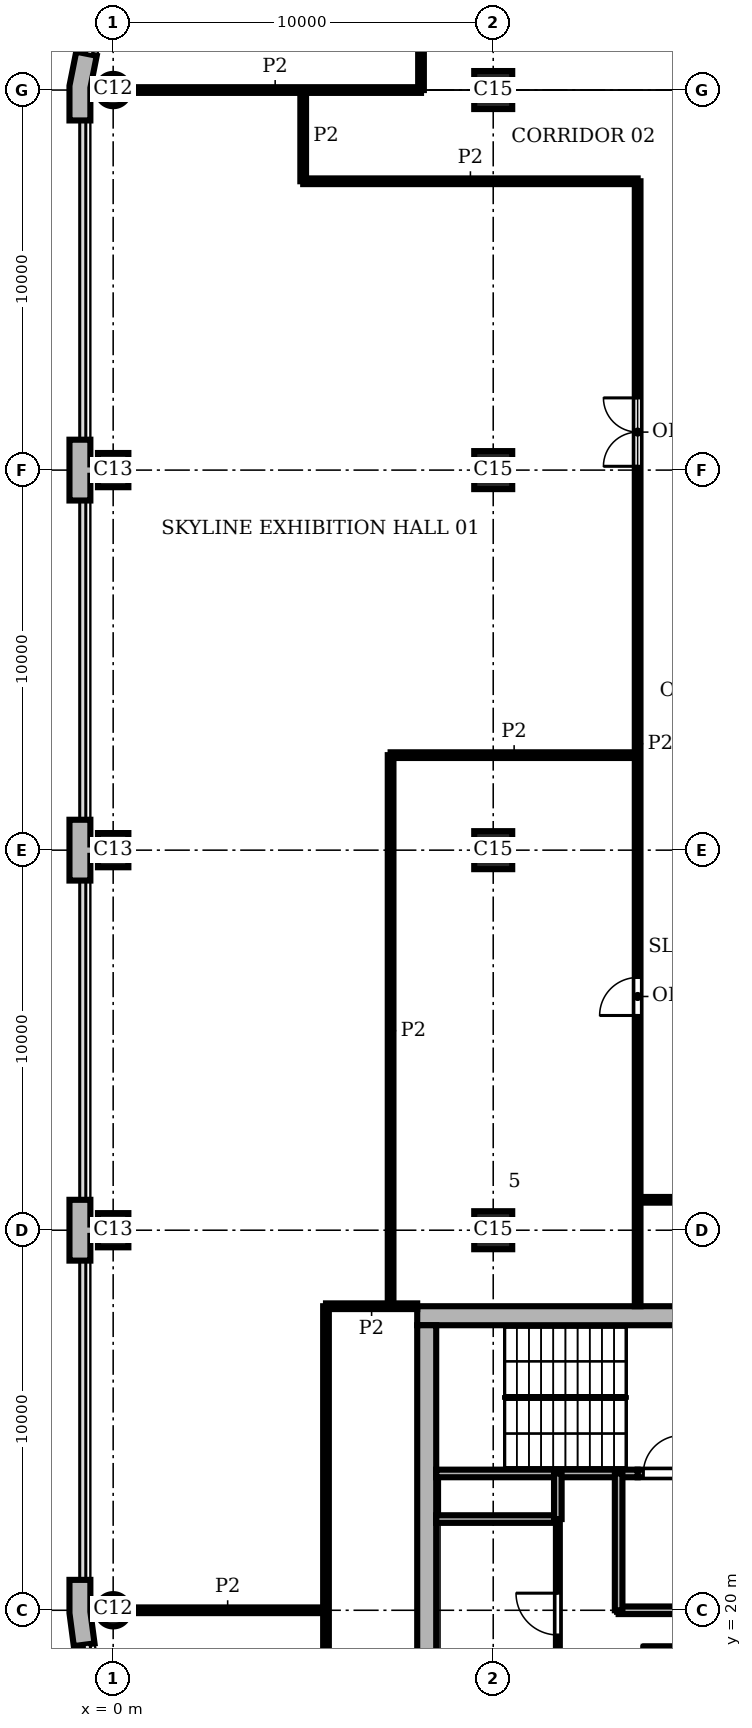
"""IFC4 building model, lengths in metres.
Left out: names, types, materials, properties, quantities, classifications, styles, units other than length and angle.
Written with IfcOpenShell. Run it as: python <this file> out.ifc"""

import sys

from ifc_helpers import new_model, si_unit, direction, frame, frame_2d, origin, origin_2d, place, context, subcontext, project, spatial, polyline, rectangle, circle, outline, extrude, element, fill, save


model = new_model("IFC4")
c1 = context("Model", 3, precision=1e-05, world=origin(), true_north=direction((0.0, 1.0)))
c2 = subcontext(c1, "Body", "Model", "MODEL_VIEW")
j1 = project(units=[si_unit("LENGTHUNIT", "METRE"), si_unit("PLANEANGLEUNIT", "RADIAN")], contexts=[c1])
p1 = place(None, origin())
s1 = spatial("IfcSite", under=j1, at=p1, CompositionType="ELEMENT")
p2 = place(p1, origin())
s2 = spatial("IfcBuilding", under=s1, at=p2, CompositionType="ELEMENT")
p3 = place(p2, frame((0.0, 0.0, 358.2)))
s3 = spatial("IfcBuildingStorey", under=s2, at=p3, CompositionType="ELEMENT", Elevation=358.2)
p4 = place(p3, frame((0.0, 60.0, 0.0), z_axis=(0.0, 0.0, 1.0), x_axis=(1.0, 0.0, 0.0)))
e1 = element("IfcColumn", 1, at=p4, inside=s3, PredefinedType="COLUMN", context=c2, shape_type="SweptSolid", body=[
    extrude(circle(Radius=0.425, at=origin_2d()), origin(), (0.0, 0.0, 1.0), 7.2),
])
for number, where, z_axis, x_axis in (
    (2, (0.0, 50.0, 0.0), (0.0, 0.0, 1.0), (0.0, 1.0, 0.0)),
    (3, (0.0, 40.0, 0.0), (0.0, 0.0, 1.0), (0.0, 1.0, 0.0)),
    (4, (0.0, 30.0, 0.0), (0.0, 0.0, 1.0), (0.0, 1.0, 0.0)),
):
    element("IfcColumn", number, at=place(p3, frame(where, z_axis=z_axis, x_axis=x_axis)), inside=s3, PredefinedType="COLUMN", context=c2, shape_type="SweptSolid", body=[
        extrude(rectangle(XDim=0.9, YDim=0.8, at=origin_2d()), origin(), (0.0, 0.0, 1.0), 7.2),
    ])
p5 = place(p3, frame((0.0, 20.0, 0.0), z_axis=(0.0, 0.0, 1.0), x_axis=(1.0, 0.0, 0.0)))
e5 = element("IfcColumn", 5, at=p5, inside=s3, PredefinedType="COLUMN", context=c2, shape_type="SweptSolid", body=[
    extrude(circle(Radius=0.425, at=origin_2d()), origin(), (0.0, 0.0, 1.0), 7.2),
])
for number, where, z_axis, x_axis in (
    (6, (10.0, 30.0, 0.0), (0.0, 0.0, 1.0), (1.0, 0.0, 0.0)),
    (7, (10.0, 40.0, 0.0), (0.0, 0.0, 1.0), (1.0, 0.0, 0.0)),
    (8, (10.0, 50.0, 0.0), (0.0, 0.0, 1.0), (1.0, 0.0, 0.0)),
    (9, (10.0, 60.0, 0.0), (0.0, 0.0, 1.0), (1.0, 0.0, 0.0)),
):
    element("IfcColumn", number, at=place(p3, frame(where, z_axis=z_axis, x_axis=x_axis)), inside=s3, PredefinedType="COLUMN", context=c2, shape_type="SweptSolid", body=[
        extrude(rectangle(XDim=1.0, YDim=1.0, at=origin_2d()), origin(), (0.0, 0.0, 1.0), 7.2),
    ])
p6 = place(p3, frame((28.0, 27.75, 0.0), z_axis=(0.0, 0.0, 1.0), x_axis=(-1.0, 0.0, 0.0)))
e10 = element("IfcWall", 10, at=p6, inside=s3, PredefinedType="SHEAR", context=c2, shape_type="SweptSolid", body=[
    extrude(rectangle(XDim=20.0, YDim=0.5, at=frame_2d((10.0, 0.0))), origin(), (0.0, 0.0, 1.0), 7.2),
])
p7 = place(p3, frame((8.25, 27.5, 0.0), z_axis=(0.0, 0.0, 1.0), x_axis=(0.0, -1.0, 0.0)))
e11 = element("IfcWall", 11, at=p7, inside=s3, PredefinedType="SHEAR", context=c2, shape_type="SweptSolid", body=[
    extrude(rectangle(XDim=19.0, YDim=0.5, at=frame_2d((9.5, 0.0))), origin(), (0.0, 0.0, 1.0), 7.2),
])
p8 = place(p3, origin())
e12 = element("IfcWall", 12, at=p8, inside=s3, PredefinedType="SOLIDWALL", context=c2, shape_type="SweptSolid", body=[
    extrude(outline(polyline([(-0.825, 60.98), (-0.972, 61.009), (-1.15, 60.113), (-1.15, 59.2), (-1.0, 59.2), (-0.6, 59.2), (-0.6, 60.059), (-0.432, 60.902), (-0.825, 60.98)])), origin(), (0.0, 0.0, 1.0), 7.2),
])
e13 = element("IfcWall", 13, at=p8, inside=s3, PredefinedType="SOLIDWALL", context=c2, shape_type="SweptSolid", body=[
    extrude(outline(polyline([(-0.6, 49.2), (-0.6, 49.85), (0.0, 49.85), (0.0, 50.15), (-0.6, 50.15), (-0.6, 50.8), (-1.0, 50.8), (-1.15, 50.8), (-1.15, 50.0), (-1.15, 49.2), (-1.0, 49.2), (-0.6, 49.2)])), origin(), (0.0, 0.0, 1.0), 7.2),
])
e14 = element("IfcWall", 14, at=p8, inside=s3, PredefinedType="SOLIDWALL", context=c2, shape_type="SweptSolid", body=[
    extrude(outline(polyline([(-0.6, 39.2), (-0.6, 39.85), (-0.45, 39.85), (-0.45, 40.15), (-0.6, 40.15), (-0.6, 40.8), (-1.0, 40.8), (-1.15, 40.8), (-1.15, 40.0), (-1.15, 39.2), (-1.0, 39.2), (-0.6, 39.2)])), origin(), (0.0, 0.0, 1.0), 7.2),
])
e15 = element("IfcWall", 15, at=p8, inside=s3, PredefinedType="SOLIDWALL", context=c2, shape_type="SweptSolid", body=[
    extrude(outline(polyline([(-0.6, 29.2), (-0.6, 29.85), (0.0, 29.85), (0.0, 30.15), (-0.6, 30.15), (-0.6, 30.8), (-1.0, 30.8), (-1.15, 30.8), (-1.15, 30.0), (-1.15, 29.2), (-1.0, 29.2), (-0.6, 29.2)])), origin(), (0.0, 0.0, 1.0), 7.2),
])
e16 = element("IfcWall", 16, at=p8, inside=s3, PredefinedType="SOLIDWALL", context=c2, shape_type="SweptSolid", body=[
    extrude(outline(polyline([(-1.0, 20.8), (-1.15, 20.8), (-1.15, 19.925), (-1.036, 19.057), (-0.887, 19.076), (-0.49, 19.128), (-0.6, 19.961), (-0.6, 20.8), (-1.0, 20.8)])), origin(), (0.0, 0.0, 1.0), 7.2),
])
p9 = place(p3, frame((14.0, 19.0, 0.0), z_axis=(0.0, 0.0, 1.0), x_axis=(1.0, 0.0, 0.0)))
e17 = element("IfcWall", 17, at=p9, inside=s3, PredefinedType="PARTITIONING", context=c2, shape_type="SweptSolid", body=[
    extrude(rectangle(XDim=8.0, YDim=0.1, at=frame_2d((4.0, 0.0))), origin(), (0.0, 0.0, 1.0), 6.75),
])
p10 = place(p9, frame((5.45, 0.0, 0.0)))
e18 = element("IfcOpeningElement", 18, at=p10, cuts=e17, PredefinedType="OPENING", context=c2, shape_type="SweptSolid", body=[
    extrude(rectangle(XDim=1.1, YDim=2.1, at=frame_2d((0.55, 1.05))), frame((0.0, 0.06, 0.0), z_axis=(0.0, -1.0, 0.0), x_axis=(1.0, 0.0, 0.0)), (0.0, 0.0, 1.0), 0.12),
])
p11 = place(p3, frame((13.3, 20.0, 0.0), z_axis=(0.0, 0.0, 1.0), x_axis=(1.0, 0.0, 0.0)))
e19 = element("IfcWall", 19, at=p11, inside=s3, PredefinedType="SHEAR", context=c2, shape_type="SweptSolid", body=[
    extrude(rectangle(XDim=4.7, YDim=0.2, at=frame_2d((2.35, 0.0))), origin(), (0.0, 0.0, 1.0), 6.75),
])
p12 = place(p3, frame((8.5, 22.4, 0.0), z_axis=(0.0, 0.0, 1.0), x_axis=(1.0, 0.0, 0.0)))
e20 = element("IfcWall", 20, at=p12, inside=s3, PredefinedType="SHEAR", context=c2, shape_type="SweptSolid", body=[
    extrude(rectangle(XDim=3.2, YDim=0.2, at=frame_2d((1.6, 0.0))), origin(), (0.0, 0.0, 1.0), 6.75),
])
p13 = place(p3, frame((8.5, 23.6, 0.0), z_axis=(0.0, 0.0, 1.0), x_axis=(1.0, 0.0, 0.0)))
e21 = element("IfcWall", 21, at=p13, inside=s3, PredefinedType="SHEAR", context=c2, shape_type="SweptSolid", body=[
    extrude(rectangle(XDim=5.3, YDim=0.2, at=frame_2d((2.65, 0.0))), origin(), (0.0, 0.0, 1.0), 6.75),
])
p14 = place(p3, frame((13.8, 23.6, 0.0), z_axis=(0.0, 0.0, 1.0), x_axis=(1.0, 0.0, 0.0)))
e22 = element("IfcWall", 22, at=p14, inside=s3, PredefinedType="SHEAR", context=c2, shape_type="SweptSolid", body=[
    extrude(rectangle(XDim=13.7, YDim=0.2, at=frame_2d((6.85, 0.0))), origin(), (0.0, 0.0, 1.0), 6.75),
])
p15 = place(p14, frame((2.4, 0.0, 0.0)))
e23 = element("IfcOpeningElement", 23, at=p15, cuts=e22, PredefinedType="OPENING", context=c2, shape_type="SweptSolid", body=[
    extrude(rectangle(XDim=1.1, YDim=2.1, at=frame_2d((0.55, 1.05))), frame((0.0, 0.11, 0.0), z_axis=(0.0, -1.0, 0.0), x_axis=(1.0, 0.0, 0.0)), (0.0, 0.0, 1.0), 0.22),
])
p16 = place(p14, frame((4.9, 0.0, 0.0)))
e24 = element("IfcOpeningElement", 24, at=p16, cuts=e22, PredefinedType="OPENING", context=c2, shape_type="SweptSolid", body=[
    extrude(rectangle(XDim=1.1, YDim=2.1, at=frame_2d((0.55, 1.05))), frame((0.0, 0.11, 0.0), z_axis=(0.0, -1.0, 0.0), x_axis=(1.0, 0.0, 0.0)), (0.0, 0.0, 1.0), 0.22),
])
p17 = place(p14, frame((0.15, 0.0, 0.0)))
e25 = element("IfcOpeningElement", 25, at=p17, cuts=e22, PredefinedType="OPENING", context=c2, shape_type="SweptSolid", body=[
    extrude(rectangle(XDim=1.0, YDim=2.1, at=frame_2d((0.5, 1.05))), frame((0.0, 0.11, 0.0), z_axis=(0.0, -1.0, 0.0), x_axis=(1.0, 0.0, 0.0)), (0.0, 0.0, 1.0), 0.22),
])
p18 = place(p3, frame((11.7, 12.4, 0.0), z_axis=(0.0, 0.0, 1.0), x_axis=(0.0, 1.0, 0.0)))
e26 = element("IfcWall", 26, at=p18, inside=s3, PredefinedType="PARTITIONING", context=c2, shape_type="SweptSolid", body=[
    extrude(rectangle(XDim=10.0, YDim=0.1, at=frame_2d((5.0, 0.0))), origin(), (0.0, 0.0, 1.0), 6.75),
])
p19 = place(p18, frame((1.95, 0.0, 0.0)))
e27 = element("IfcOpeningElement", 27, at=p19, cuts=e26, PredefinedType="OPENING", context=c2, shape_type="SweptSolid", body=[
    extrude(rectangle(XDim=1.1, YDim=2.1, at=frame_2d((0.55, 1.05))), frame((0.0, 0.06, 0.0), z_axis=(0.0, -1.0, 0.0), x_axis=(1.0, 0.0, 0.0)), (0.0, 0.0, 1.0), 0.12),
])
p20 = place(p18, frame((6.95, 0.0, 0.0)))
e28 = element("IfcOpeningElement", 28, at=p20, cuts=e26, PredefinedType="OPENING", context=c2, shape_type="SweptSolid", body=[
    extrude(rectangle(XDim=1.1, YDim=2.1, at=frame_2d((0.55, 1.05))), frame((0.0, 0.06, 0.0), z_axis=(0.0, -1.0, 0.0), x_axis=(1.0, 0.0, 0.0)), (0.0, 0.0, 1.0), 0.12),
])
p21 = place(p3, frame((11.7, 22.4, 0.0), z_axis=(0.0, 0.0, 1.0), x_axis=(0.0, 1.0, 0.0)))
e29 = element("IfcWall", 29, at=p21, inside=s3, PredefinedType="SHEAR", context=c2, shape_type="SweptSolid", body=[
    extrude(rectangle(XDim=1.2, YDim=0.2, at=frame_2d((0.6, 0.0))), origin(), (0.0, 0.0, 1.0), 6.75),
])
p22 = place(p3, frame((13.3, 20.0, 0.0), z_axis=(0.0, 0.0, 1.0), x_axis=(0.0, 1.0, 0.0)))
e30 = element("IfcWall", 30, at=p22, inside=s3, PredefinedType="SHEAR", context=c2, shape_type="SweptSolid", body=[
    extrude(rectangle(XDim=3.6, YDim=0.2, at=frame_2d((1.8, 0.0))), origin(), (0.0, 0.0, 1.0), 6.75),
])
p23 = place(p3, frame((5.0, 57.6, 0.0), z_axis=(0.0, 0.0, 1.0), x_axis=(0.0, 1.0, 0.0)))
e31 = element("IfcWall", 31, at=p23, inside=s3, PredefinedType="PARTITIONING", context=c2, shape_type="SweptSolid", body=[
    extrude(rectangle(XDim=2.4, YDim=0.15, at=frame_2d((1.2, 0.0))), origin(), (0.0, 0.0, 1.0), 6.75),
])
p24 = place(p3, frame((5.6, 5.6, 0.0), z_axis=(0.0, 0.0, 1.0), x_axis=(0.0, 1.0, 0.0)))
e32 = element("IfcWall", 32, at=p24, inside=s3, PredefinedType="PARTITIONING", context=c2, shape_type="SweptSolid", body=[
    extrude(rectangle(XDim=22.4, YDim=0.15, at=frame_2d((11.2, 0.0))), origin(), (0.0, 0.0, 1.0), 6.75),
])
p25 = place(p24, frame((4.1, 0.0, 0.0)))
e33 = element("IfcOpeningElement", 33, at=p25, cuts=e32, PredefinedType="OPENING", context=c2, shape_type="SweptSolid", body=[
    extrude(rectangle(XDim=1.0, YDim=2.1, at=frame_2d((0.5, 1.05))), frame((0.0, 0.085, 0.0), z_axis=(0.0, -1.0, 0.0), x_axis=(1.0, 0.0, 0.0)), (0.0, 0.0, 1.0), 0.17),
])
p26 = place(p24, frame((11.5, 0.0, 0.0)))
e34 = element("IfcOpeningElement", 34, at=p26, cuts=e32, PredefinedType="OPENING", context=c2, shape_type="SweptSolid", body=[
    extrude(rectangle(XDim=0.8, YDim=2.1, at=frame_2d((0.4, 1.05))), frame((0.0, 0.085, 0.0), z_axis=(0.0, -1.0, 0.0), x_axis=(1.0, 0.0, 0.0)), (0.0, 0.0, 1.0), 0.17),
])
p27 = place(p3, frame((7.3, 28.0, 0.0), z_axis=(0.0, 0.0, 1.0), x_axis=(0.0, 1.0, 0.0)))
e35 = element("IfcWall", 35, at=p27, inside=s3, PredefinedType="PARTITIONING", context=c2, shape_type="SweptSolid", body=[
    extrude(rectangle(XDim=14.5, YDim=0.15, at=frame_2d((7.25, 0.0))), origin(), (0.0, 0.0, 1.0), 6.75),
])
p28 = place(p3, frame((8.1, 60.0, 0.0), z_axis=(0.0, 0.0, 1.0), x_axis=(0.0, 1.0, 0.0)))
e36 = element("IfcWall", 36, at=p28, inside=s3, PredefinedType="PARTITIONING", context=c2, shape_type="SweptSolid", body=[
    extrude(rectangle(XDim=6.4, YDim=0.15, at=frame_2d((3.2, 0.0))), origin(), (0.0, 0.0, 1.0), 6.75),
])
p29 = place(p28, frame((1.85, 0.0, 0.0)))
e37 = element("IfcOpeningElement", 37, at=p29, cuts=e36, PredefinedType="OPENING", context=c2, shape_type="SweptSolid", body=[
    extrude(rectangle(XDim=1.8, YDim=2.1, at=frame_2d((0.9, 1.05))), frame((0.0, 0.085, 0.0), z_axis=(0.0, -1.0, 0.0), x_axis=(1.0, 0.0, 0.0)), (0.0, 0.0, 1.0), 0.17),
])
p30 = place(p3, frame((13.8, 28.0, 0.0), z_axis=(0.0, 0.0, 1.0), x_axis=(0.0, 1.0, 0.0)))
e38 = element("IfcWall", 38, at=p30, inside=s3, PredefinedType="PARTITIONING", context=c2, shape_type="SweptSolid", body=[
    extrude(rectangle(XDim=29.6, YDim=0.15, at=frame_2d((14.8, 0.0))), origin(), (0.0, 0.0, 1.0), 6.75),
])
p31 = place(p30, frame((7.65, 0.0, 0.0)))
e39 = element("IfcOpeningElement", 39, at=p31, cuts=e38, PredefinedType="OPENING", context=c2, shape_type="SweptSolid", body=[
    extrude(rectangle(XDim=1.0, YDim=2.1, at=frame_2d((0.5, 1.05))), frame((0.0, 0.085, 0.0), z_axis=(0.0, -1.0, 0.0), x_axis=(1.0, 0.0, 0.0)), (0.0, 0.0, 1.0), 0.17),
])
p32 = place(p30, frame((22.1, 0.0, 0.0)))
e40 = element("IfcOpeningElement", 40, at=p32, cuts=e38, PredefinedType="OPENING", context=c2, shape_type="SweptSolid", body=[
    extrude(rectangle(XDim=1.8, YDim=2.1, at=frame_2d((0.9, 1.05))), frame((0.0, 0.085, 0.0), z_axis=(0.0, -1.0, 0.0), x_axis=(1.0, 0.0, 0.0)), (0.0, 0.0, 1.0), 0.17),
])
p33 = place(p3, frame((0.425, 20.0, 0.0), z_axis=(0.0, 0.0, 1.0), x_axis=(1.0, 0.0, 0.0)))
e41 = element("IfcWall", 41, at=p33, inside=s3, PredefinedType="PARTITIONING", context=c2, shape_type="SweptSolid", body=[
    extrude(rectangle(XDim=5.175, YDim=0.15, at=frame_2d((2.587, 0.0))), origin(), (0.0, 0.0, 1.0), 6.75),
])
p34 = place(p3, frame((5.6, 28.0, 0.0), z_axis=(0.0, 0.0, 1.0), x_axis=(1.0, 0.0, 0.0)))
e42 = element("IfcWall", 42, at=p34, inside=s3, PredefinedType="PARTITIONING", context=c2, shape_type="SweptSolid", body=[
    extrude(rectangle(XDim=2.4, YDim=0.15, at=frame_2d((1.2, 0.0))), origin(), (0.0, 0.0, 1.0), 6.75),
])
p35 = place(p3, frame((13.802, 30.8, 0.0), z_axis=(0.0, 0.0, 1.0), x_axis=(1.0, 0.0, 0.0)))
e43 = element("IfcWall", 43, at=p35, inside=s3, PredefinedType="PARTITIONING", context=c2, shape_type="SweptSolid", body=[
    extrude(rectangle(XDim=16.797, YDim=0.15, at=frame_2d((8.398, 0.0))), origin(), (0.0, 0.0, 1.0), 6.75),
])
p36 = place(p35, frame((7.85, 0.0, 0.0)))
e44 = element("IfcOpeningElement", 44, at=p36, cuts=e43, PredefinedType="OPENING", context=c2, shape_type="SweptSolid", body=[
    extrude(rectangle(XDim=1.0, YDim=2.1, at=frame_2d((0.5, 1.05))), frame((0.0, 0.085, 0.0), z_axis=(0.0, -1.0, 0.0), x_axis=(1.0, 0.0, 0.0)), (0.0, 0.0, 1.0), 0.17),
])
p37 = place(p3, frame((7.3, 42.5, 0.0), z_axis=(0.0, 0.0, 1.0), x_axis=(1.0, 0.0, 0.0)))
e45 = element("IfcWall", 45, at=p37, inside=s3, PredefinedType="PARTITIONING", context=c2, shape_type="SweptSolid", body=[
    extrude(rectangle(XDim=6.5, YDim=0.15, at=frame_2d((3.25, 0.0))), origin(), (0.0, 0.0, 1.0), 6.75),
])
p38 = place(p3, frame((5.0, 57.6, 0.0), z_axis=(0.0, 0.0, 1.0), x_axis=(1.0, 0.0, 0.0)))
e46 = element("IfcWall", 46, at=p38, inside=s3, PredefinedType="PARTITIONING", context=c2, shape_type="SweptSolid", body=[
    extrude(rectangle(XDim=8.8, YDim=0.15, at=frame_2d((4.4, 0.0))), origin(), (0.0, 0.0, 1.0), 6.75),
])
p39 = place(p3, frame((0.425, 60.0, 0.0), z_axis=(0.0, 0.0, 1.0), x_axis=(1.0, 0.0, 0.0)))
e47 = element("IfcWall", 47, at=p39, inside=s3, PredefinedType="PARTITIONING", context=c2, shape_type="SweptSolid", body=[
    extrude(rectangle(XDim=7.675, YDim=0.15, at=frame_2d((3.837, 0.0))), origin(), (0.0, 0.0, 1.0), 6.75),
])
p40 = place(p17, origin())
e48 = element("IfcDoor", 48, at=p40, inside=s3, OperationType="SINGLE_SWING_RIGHT", PredefinedType="DOOR", context=c2, shape_type="SweptSolid", body=[
    extrude(rectangle(XDim=1.0, YDim=2.1, at=frame_2d((0.5, 1.05))), frame((0.0, 0.025, 0.0), z_axis=(0.0, -1.0, 0.0), x_axis=(1.0, 0.0, 0.0)), (0.0, 0.0, 1.0), 0.05),
])
fill(e25, e48)
p41 = place(p20, origin())
e49 = element("IfcDoor", 49, at=p41, inside=s3, OperationType="SINGLE_SWING_RIGHT", PredefinedType="DOOR", context=c2, shape_type="SweptSolid", body=[
    extrude(rectangle(XDim=1.1, YDim=2.1, at=frame_2d((0.55, 1.05))), frame((0.0, 0.025, 0.0), z_axis=(0.0, -1.0, 0.0), x_axis=(1.0, 0.0, 0.0)), (0.0, 0.0, 1.0), 0.05),
])
fill(e28, e49)
p42 = place(p31, origin())
e50 = element("IfcDoor", 50, at=p42, inside=s3, OperationType="SINGLE_SWING_LEFT", PredefinedType="DOOR", context=c2, shape_type="SweptSolid", body=[
    extrude(rectangle(XDim=1.0, YDim=2.1, at=frame_2d((0.5, 1.05))), frame((0.0, 0.025, 0.0), z_axis=(0.0, -1.0, 0.0), x_axis=(1.0, 0.0, 0.0)), (0.0, 0.0, 1.0), 0.05),
])
fill(e39, e50)
p43 = place(p32, origin())
e51 = element("IfcDoor", 51, at=p43, inside=s3, OperationType="DOUBLE_DOOR_SINGLE_SWING", PredefinedType="DOOR", context=c2, shape_type="SweptSolid", body=[
    extrude(rectangle(XDim=1.8, YDim=2.1, at=frame_2d((0.9, 1.05))), frame((0.0, 0.025, 0.0), z_axis=(0.0, -1.0, 0.0), x_axis=(1.0, 0.0, 0.0)), (0.0, 0.0, 1.0), 0.05),
])
fill(e40, e51)
save(model, sys.argv[1])
